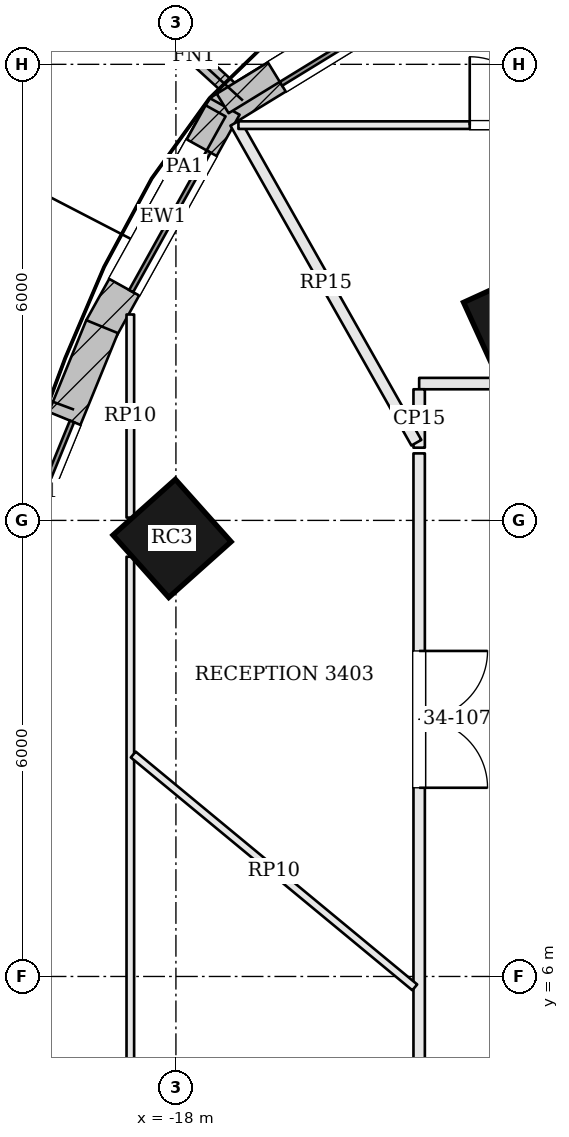
"""IFC4 building model, lengths in metres.
Left out: names, types, materials, properties, quantities, classifications, styles, units other than length and angle.
Written with IfcOpenShell. Run it as: python <this file> out.ifc"""

import sys

from ifc_helpers import new_model, si_unit, direction, frame, frame_2d, origin, origin_2d, place, context, subcontext, project, spatial, rectangle, extrude, element, fill, save


model = new_model("IFC4")
c1 = context("Model", 3, precision=1e-05, world=origin(), true_north=direction((0.0, 1.0)))
c2 = subcontext(c1, "Body", "Model", "MODEL_VIEW")
j1 = project(units=[si_unit("LENGTHUNIT", "METRE"), si_unit("PLANEANGLEUNIT", "RADIAN")], contexts=[c1])
p1 = place(None, origin())
s1 = spatial("IfcSite", under=j1, at=p1, CompositionType="ELEMENT")
p2 = place(p1, origin())
s2 = spatial("IfcBuilding", under=s1, at=p2, CompositionType="ELEMENT")
p3 = place(p2, frame((0.0, 0.0, 142.2)))
s3 = spatial("IfcBuildingStorey", under=s2, at=p3, CompositionType="ELEMENT", Elevation=142.2)
for number, where, z_axis, x_axis in (
    (1, (-13.487, 14.596, 0.0), (0.0, 0.0, 1.0), (-0.91, -0.415, 0.0)),
    (2, (-18.051, 11.763, 0.0), (0.0, 0.0, 1.0), (-0.746, -0.666, 0.0)),
):
    element("IfcColumn", number, at=place(p3, frame(where, z_axis=z_axis, x_axis=x_axis)), inside=s3, PredefinedType="COLUMN", context=c2, shape_type="SweptSolid", body=[
        extrude(rectangle(XDim=1.1, YDim=1.1, at=origin_2d()), origin(), (0.0, 0.0, 1.0), 3.9),
    ])
p4 = place(p3, frame((-14.116, 19.4, 0.0), z_axis=(0.0, 0.0, 1.0), x_axis=(-0.852622865325, -0.522526793117, 0.0)))
e3 = element("IfcWall", 3, at=p4, inside=s3, PredefinedType="SOLIDWALL", context=c2, shape_type="SweptSolid", body=[
    extrude(rectangle(XDim=3.896, YDim=0.45, at=frame_2d((1.948, 0.0))), origin(), (0.0, 0.0, 1.0), 3.7),
])
p5 = place(p4, frame((0.898, 0.0, 0.9)))
e4 = element("IfcOpeningElement", 4, at=p5, cuts=e3, PredefinedType="OPENING", context=c2, shape_type="SweptSolid", body=[
    extrude(rectangle(XDim=2.1, YDim=2.3, at=frame_2d((1.05, 1.15))), frame((0.0, 0.235, 0.0), z_axis=(0.0, -1.0, 0.0), x_axis=(1.0, 0.0, 0.0)), (0.0, 0.0, 1.0), 0.47),
])
p6 = place(p3, frame((-17.359, 17.447, 0.0), z_axis=(0.0, 0.0, 1.0), x_axis=(-0.485618126214, -0.874171056197, 0.0)))
e5 = element("IfcWall", 5, at=p6, inside=s3, PredefinedType="SOLIDWALL", context=c2, shape_type="SweptSolid", body=[
    extrude(rectangle(XDim=3.343, YDim=0.45, at=frame_2d((1.671, 0.0))), origin(), (0.0, 0.0, 1.0), 3.7),
])
p7 = place(p6, frame((0.621, 0.0, 0.9)))
e6 = element("IfcOpeningElement", 6, at=p7, cuts=e5, PredefinedType="OPENING", context=c2, shape_type="SweptSolid", body=[
    extrude(rectangle(XDim=2.1, YDim=2.3, at=frame_2d((1.05, 1.15))), frame((0.0, 0.235, 0.0), z_axis=(0.0, -1.0, 0.0), x_axis=(1.0, 0.0, 0.0)), (0.0, 0.0, 1.0), 0.47),
])
p8 = place(p3, frame((-18.971, 14.549, 0.0), z_axis=(0.0, 0.0, 1.0), x_axis=(-0.378434936431, -0.925627894398, 0.0)))
e7 = element("IfcWall", 7, at=p8, inside=s3, PredefinedType="SOLIDWALL", context=c2, shape_type="SweptSolid", body=[
    extrude(rectangle(XDim=4.708, YDim=0.45, at=frame_2d((2.354, 0.0))), origin(), (0.0, 0.0, 1.0), 3.7),
])
p9 = place(p8, frame((1.304, 0.0, 0.9)))
e8 = element("IfcOpeningElement", 8, at=p9, cuts=e7, PredefinedType="OPENING", context=c2, shape_type="SweptSolid", body=[
    extrude(rectangle(XDim=2.1, YDim=2.3, at=frame_2d((1.05, 1.15))), frame((0.0, 0.235, 0.0), z_axis=(0.0, -1.0, 0.0), x_axis=(1.0, 0.0, 0.0)), (0.0, 0.0, 1.0), 0.47),
])
p10 = place(p3, frame((-17.119, 17.523, 0.0), z_axis=(0.0, 0.0, 1.0), x_axis=(-0.737866019047, 0.674947211221, 0.0)))
e9 = element("IfcWall", 9, at=p10, inside=s3, PredefinedType="SOLIDWALL", context=c2, shape_type="SweptSolid", body=[
    extrude(rectangle(XDim=1.75, YDim=0.2, at=frame_2d((0.875, 0.0))), origin(), (0.0, 0.0, 1.0), 3.7),
])
p11 = place(p3, frame((-14.266, 19.396, 3.9), z_axis=(0.0, 0.0, 1.0), x_axis=(-0.852626191256, -0.522521366055, 0.0)))
e10 = element("IfcWall", 10, at=p11, inside=s3, PredefinedType="PARAPET", context=c2, shape_type="SweptSolid", body=[
    extrude(rectangle(XDim=3.658, YDim=0.3, at=frame_2d((1.829, 0.0))), origin(), (0.0, 0.0, 1.0), 1.1),
])
p12 = place(p3, frame((-17.478, 17.388, 3.9), z_axis=(0.0, 0.0, 1.0), x_axis=(-0.485655243725, -0.874150435705, 0.0)))
e11 = element("IfcWall", 11, at=p12, inside=s3, PredefinedType="PARAPET", context=c2, shape_type="SweptSolid", body=[
    extrude(rectangle(XDim=1.684, YDim=0.3, at=frame_2d((0.842, 0.0))), origin(), (0.0, 0.0, 1.0), 1.1),
])
p13 = place(p3, frame((3.012, 13.8, 0.0), z_axis=(0.0, 0.0, 1.0), x_axis=(-1.0, 0.0, 0.0)))
e12 = element("IfcWall", 12, at=p13, inside=s3, PredefinedType="PARTITIONING", context=c2, shape_type="SweptSolid", body=[
    extrude(rectangle(XDim=17.812, YDim=0.15, at=frame_2d((8.906, 0.0))), origin(), (0.0, 0.0, 1.0), 3.198),
])
p14 = place(p13, frame((3.342, 0.0, 0.0)))
e13 = element("IfcOpeningElement", 13, at=p14, cuts=e12, PredefinedType="OPENING", context=c2, shape_type="SweptSolid", body=[
    extrude(rectangle(XDim=1.8, YDim=2.1, at=frame_2d((0.9, 1.05))), frame((0.0, 0.085, 0.0), z_axis=(0.0, -1.0, 0.0), x_axis=(1.0, 0.0, 0.0)), (0.0, 0.0, 1.0), 0.17),
])
p15 = place(p13, frame((9.659, 0.0, 0.0)))
e14 = element("IfcOpeningElement", 14, at=p15, cuts=e12, PredefinedType="OPENING", context=c2, shape_type="SweptSolid", body=[
    extrude(rectangle(XDim=1.0, YDim=2.4, at=frame_2d((0.5, 1.2))), frame((0.0, 0.085, 0.0), z_axis=(0.0, -1.0, 0.0), x_axis=(1.0, 0.0, 0.0)), (0.0, 0.0, 1.0), 0.17),
])
p16 = place(p13, frame((14.25, 0.0, 0.0)))
e15 = element("IfcOpeningElement", 15, at=p16, cuts=e12, PredefinedType="OPENING", context=c2, shape_type="SweptSolid", body=[
    extrude(rectangle(XDim=1.0, YDim=2.1, at=frame_2d((0.5, 1.05))), frame((0.0, 0.085, 0.0), z_axis=(0.0, -1.0, 0.0), x_axis=(1.0, 0.0, 0.0)), (0.0, 0.0, 1.0), 0.17),
])
p17 = place(p3, frame((-14.8, 13.725, 0.0), z_axis=(0.0, 0.0, 1.0), x_axis=(0.0, -1.0, 0.0)))
e16 = element("IfcWall", 16, at=p17, inside=s3, PredefinedType="PARTITIONING", context=c2, shape_type="SweptSolid", body=[
    extrude(rectangle(XDim=0.769, YDim=0.15, at=frame_2d((0.384, 0.0))), origin(), (0.0, 0.0, 1.0), 3.198),
])
p18 = place(p3, frame((-17.218, 17.23, 0.0), z_axis=(0.0, 0.0, 1.0), x_axis=(0.492436580725, -0.870348329098, 0.0)))
e17 = element("IfcWall", 17, at=p18, inside=s3, PredefinedType="PARTITIONING", context=c2, shape_type="SweptSolid", body=[
    extrude(rectangle(XDim=4.835, YDim=0.15, at=frame_2d((2.417, 0.0))), origin(), (0.0, 0.0, 1.0), 3.198),
])
p19 = place(p3, frame((-14.8, 12.882, 0.0), z_axis=(0.0, 0.0, 1.0), x_axis=(0.0, -1.0, 0.0)))
e18 = element("IfcWall", 18, at=p19, inside=s3, PredefinedType="PARTITIONING", context=c2, shape_type="SweptSolid", body=[
    extrude(rectangle(XDim=16.652, YDim=0.15, at=frame_2d((8.326, 0.0))), origin(), (0.0, 0.0, 1.0), 3.198),
])
p20 = place(p19, frame((2.599, 0.0, 0.0)))
e19 = element("IfcOpeningElement", 19, at=p20, cuts=e18, PredefinedType="OPENING", context=c2, shape_type="SweptSolid", body=[
    extrude(rectangle(XDim=1.8, YDim=2.1, at=frame_2d((0.9, 1.05))), frame((0.0, 0.085, 0.0), z_axis=(0.0, -1.0, 0.0), x_axis=(1.0, 0.0, 0.0)), (0.0, 0.0, 1.0), 0.17),
])
p21 = place(p19, frame((9.456, 0.0, 0.0)))
e20 = element("IfcOpeningElement", 20, at=p21, cuts=e18, PredefinedType="OPENING", context=c2, shape_type="SweptSolid", body=[
    extrude(rectangle(XDim=1.0, YDim=2.4, at=frame_2d((0.5, 1.2))), frame((0.0, 0.085, 0.0), z_axis=(0.0, -1.0, 0.0), x_axis=(1.0, 0.0, 0.0)), (0.0, 0.0, 1.0), 0.17),
])
p22 = place(p19, frame((14.15, 0.0, 0.0)))
e21 = element("IfcOpeningElement", 21, at=p22, cuts=e18, PredefinedType="OPENING", context=c2, shape_type="SweptSolid", body=[
    extrude(rectangle(XDim=1.0, YDim=2.1, at=frame_2d((0.5, 1.05))), frame((0.0, 0.085, 0.0), z_axis=(0.0, -1.0, 0.0), x_axis=(1.0, 0.0, 0.0)), (0.0, 0.0, 1.0), 0.17),
])
p23 = place(p3, frame((-17.178, 17.2, 0.0), z_axis=(0.0, 0.0, 1.0), x_axis=(1.0, 0.0, 0.0)))
e22 = element("IfcWall", 22, at=p23, inside=s3, PredefinedType="PARTITIONING", context=c2, shape_type="SweptSolid", body=[
    extrude(rectangle(XDim=13.585, YDim=0.1, at=frame_2d((6.792, 0.0))), origin(), (0.0, 0.0, 1.0), 3.184),
])
p24 = place(p23, frame((3.043, 0.0, 0.0)))
e23 = element("IfcOpeningElement", 23, at=p24, cuts=e22, PredefinedType="OPENING", context=c2, shape_type="SweptSolid", body=[
    extrude(rectangle(XDim=0.9, YDim=2.1, at=frame_2d((0.45, 1.05))), frame((0.0, 0.06, 0.0), z_axis=(0.0, -1.0, 0.0), x_axis=(1.0, 0.0, 0.0)), (0.0, 0.0, 1.0), 0.12),
])
p25 = place(p3, frame((-18.6, -5.397, 0.0), z_axis=(0.0, 0.0, 1.0), x_axis=(0.0, 1.0, 0.0)))
e24 = element("IfcWall", 24, at=p25, inside=s3, PredefinedType="PARTITIONING", context=c2, shape_type="SweptSolid", body=[
    extrude(rectangle(XDim=16.919, YDim=0.1, at=frame_2d((8.459, 0.0))), origin(), (0.0, 0.0, 1.0), 3.184),
])
p26 = place(p25, frame((1.975, 0.0, 0.0)))
e25 = element("IfcOpeningElement", 25, at=p26, cuts=e24, PredefinedType="OPENING", context=c2, shape_type="SweptSolid", body=[
    extrude(rectangle(XDim=0.9, YDim=2.1, at=frame_2d((0.45, 1.05))), frame((0.0, 0.06, 0.0), z_axis=(0.0, -1.0, 0.0), x_axis=(1.0, 0.0, 0.0)), (0.0, 0.0, 1.0), 0.12),
])
p27 = place(p25, frame((7.95, 0.0, 0.0)))
e26 = element("IfcOpeningElement", 26, at=p27, cuts=e24, PredefinedType="OPENING", context=c2, shape_type="SweptSolid", body=[
    extrude(rectangle(XDim=1.0, YDim=2.4, at=frame_2d((0.5, 1.2))), frame((0.0, 0.06, 0.0), z_axis=(0.0, -1.0, 0.0), x_axis=(1.0, 0.0, 0.0)), (0.0, 0.0, 1.0), 0.12),
])
p28 = place(p3, frame((-18.6, 12.037, 0.0), z_axis=(0.0, 0.0, 1.0), x_axis=(0.0, 1.0, 0.0)))
e27 = element("IfcWall", 27, at=p28, inside=s3, PredefinedType="PARTITIONING", context=c2, shape_type="SweptSolid", body=[
    extrude(rectangle(XDim=2.672, YDim=0.1, at=frame_2d((1.336, 0.0))), origin(), (0.0, 0.0, 1.0), 3.184),
])
p29 = place(p3, frame((-14.858, 5.857, 0.0), z_axis=(0.0, 0.0, 1.0), x_axis=(-0.770605931108, 0.637311932213, 0.0)))
e28 = element("IfcWall", 28, at=p29, inside=s3, PredefinedType="PARTITIONING", context=c2, shape_type="SweptSolid", body=[
    extrude(rectangle(XDim=4.806, YDim=0.1, at=frame_2d((2.403, 0.0))), origin(), (0.0, 0.0, 1.0), 3.184),
])
p30 = place(p5, origin())
e29 = element("IfcWindow", 29, at=p30, inside=s3, PartitioningType="SINGLE_PANEL", PredefinedType="WINDOW", context=c2, shape_type="SweptSolid", body=[
    extrude(rectangle(XDim=2.1, YDim=2.3, at=frame_2d((1.05, 1.15))), frame((0.0, 0.135, 0.0), z_axis=(0.0, -1.0, 0.0), x_axis=(1.0, 0.0, 0.0)), (0.0, 0.0, 1.0), 0.06),
])
fill(e4, e29)
p31 = place(p7, origin())
e30 = element("IfcWindow", 30, at=p31, inside=s3, PartitioningType="SINGLE_PANEL", PredefinedType="WINDOW", context=c2, shape_type="SweptSolid", body=[
    extrude(rectangle(XDim=2.1, YDim=2.3, at=frame_2d((1.05, 1.15))), frame((0.0, 0.135, 0.0), z_axis=(0.0, -1.0, 0.0), x_axis=(1.0, 0.0, 0.0)), (0.0, 0.0, 1.0), 0.06),
])
fill(e6, e30)
p32 = place(p9, origin())
e31 = element("IfcWindow", 31, at=p32, inside=s3, PartitioningType="SINGLE_PANEL", PredefinedType="WINDOW", context=c2, shape_type="SweptSolid", body=[
    extrude(rectangle(XDim=2.1, YDim=2.3, at=frame_2d((1.05, 1.15))), frame((0.0, 0.135, 0.0), z_axis=(0.0, -1.0, 0.0), x_axis=(1.0, 0.0, 0.0)), (0.0, 0.0, 1.0), 0.06),
])
fill(e8, e31)
p33 = place(p24, origin())
e32 = element("IfcDoor", 32, at=p33, inside=s3, OperationType="SINGLE_SWING_LEFT", PredefinedType="DOOR", context=c2, shape_type="SweptSolid", body=[
    extrude(rectangle(XDim=0.9, YDim=2.1, at=frame_2d((0.45, 1.05))), frame((0.0, 0.025, 0.0), z_axis=(0.0, -1.0, 0.0), x_axis=(1.0, 0.0, 0.0)), (0.0, 0.0, 1.0), 0.05),
])
fill(e23, e32)
p34 = place(p20, origin())
e33 = element("IfcDoor", 33, at=p34, inside=s3, OperationType="DOUBLE_DOOR_SINGLE_SWING", PredefinedType="DOOR", context=c2, shape_type="SweptSolid", body=[
    extrude(rectangle(XDim=1.8, YDim=2.1, at=frame_2d((0.9, 1.05))), frame((0.0, 0.025, 0.0), z_axis=(0.0, -1.0, 0.0), x_axis=(1.0, 0.0, 0.0)), (0.0, 0.0, 1.0), 0.05),
])
fill(e19, e33)
save(model, sys.argv[1])
